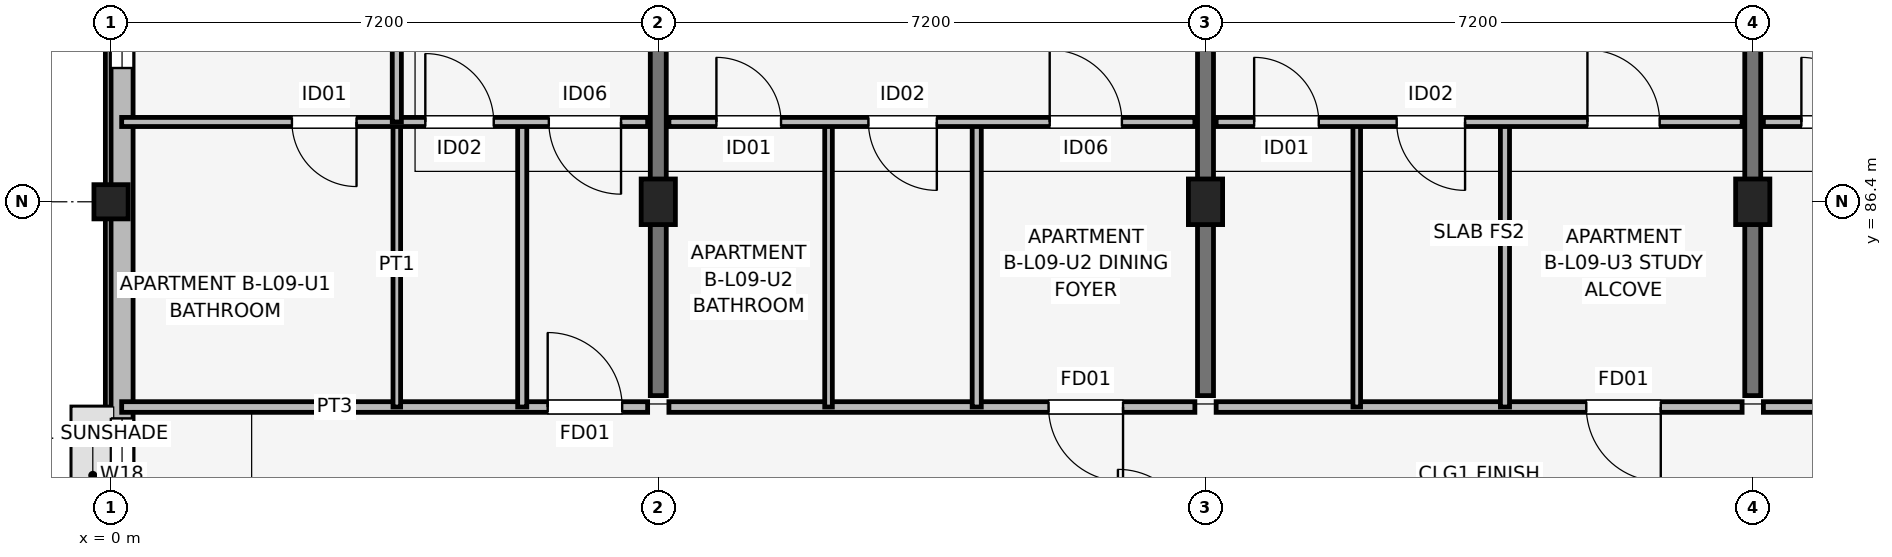
"""IFC4 building model, lengths in metres.
Left out: names, types, materials, properties, quantities, classifications, styles, units other than length and angle.
Written with IfcOpenShell. Run it as: python <this file> out.ifc"""

import sys

from ifc_helpers import new_model, si_unit, direction, frame, frame_2d, origin, origin_2d, place, context, subcontext, project, spatial, rectangle, extrude, element, fill, save


model = new_model("IFC4")
c1 = context("Model", 3, precision=1e-05, world=origin(), true_north=direction((0.0, 1.0)))
c2 = subcontext(c1, "Body", "Model", "MODEL_VIEW")
j1 = project(units=[si_unit("LENGTHUNIT", "METRE"), si_unit("PLANEANGLEUNIT", "RADIAN")], contexts=[c1])
p1 = place(None, origin())
s1 = spatial("IfcSite", under=j1, at=p1, CompositionType="ELEMENT")
p2 = place(p1, origin())
s2 = spatial("IfcBuilding", under=s1, at=p2, CompositionType="ELEMENT")
p3 = place(p2, frame((0.0, 0.0, 30.75)))
s3 = spatial("IfcBuildingStorey", under=s2, at=p3, CompositionType="ELEMENT", Elevation=30.75)
p4 = place(p3, frame((0.0, 86.4, 0.0), z_axis=(0.0, 0.0, 1.0), x_axis=(1.0, 0.0, 0.0)))
e1 = element("IfcColumn", 1, at=p4, inside=s3, PredefinedType="COLUMN", context=c2, shape_type="SweptSolid", body=[
    extrude(rectangle(XDim=0.45, YDim=0.45, at=origin_2d()), origin(), (0.0, 0.0, 1.0), 3.15),
])
for number, where, z_axis, x_axis in (
    (2, (7.2, 86.4, 0.0), (0.0, 0.0, 1.0), (1.0, 0.0, 0.0)),
    (3, (14.4, 86.4, 0.0), (0.0, 0.0, 1.0), (1.0, 0.0, 0.0)),
    (4, (21.6, 86.4, 0.0), (0.0, 0.0, 1.0), (1.0, 0.0, 0.0)),
):
    element("IfcColumn", number, at=place(p3, frame(where, z_axis=z_axis, x_axis=x_axis)), inside=s3, PredefinedType="COLUMN", context=c2, shape_type="SweptSolid", body=[
        extrude(rectangle(XDim=0.45, YDim=0.6, at=origin_2d()), origin(), (0.0, 0.0, 1.0), 3.15),
    ])
for number, where, z_axis, x_axis in (
    (5, (7.2, 83.85, 0.0), (0.0, 0.0, 1.0), (0.0, 1.0, 0.0)),
    (6, (14.4, 83.85, 0.0), (0.0, 0.0, 1.0), (0.0, 1.0, 0.0)),
    (7, (21.6, 83.85, 0.0), (0.0, 0.0, 1.0), (0.0, 1.0, 0.0)),
):
    element("IfcWall", number, at=place(p3, frame(where, z_axis=z_axis, x_axis=x_axis)), inside=s3, PredefinedType="SHEAR", context=c2, shape_type="SweptSolid", body=[
        extrude(rectangle(XDim=9.4, YDim=0.21, at=frame_2d((4.7, 0.0))), origin(), (0.0, 0.0, 1.0), 3.15),
    ])
p5 = place(p3, frame((0.145, 90.4, 0.0), z_axis=(0.0, 0.0, 1.0), x_axis=(0.0, -1.0, 0.0)))
e8 = element("IfcWall", 8, at=p5, inside=s3, PredefinedType="SOLIDWALL", context=c2, shape_type="SweptSolid", body=[
    extrude(rectangle(XDim=15.2, YDim=0.29, at=frame_2d((7.6, 0.0))), origin(), (0.0, 0.0, 1.0), 2.48),
])
p6 = place(p5, frame((6.85, 0.0, 1.05)))
e9 = element("IfcOpeningElement", 9, at=p6, cuts=e8, PredefinedType="OPENING", context=c2, shape_type="SweptSolid", body=[
    extrude(rectangle(XDim=1.5, YDim=1.15, at=frame_2d((0.75, 0.575))), frame((0.0, 0.155, 0.0), z_axis=(0.0, -1.0, 0.0), x_axis=(1.0, 0.0, 0.0)), (0.0, 0.0, 1.0), 0.31),
])
p7 = place(p5, frame((0.94, 0.0, 0.75)))
e10 = element("IfcOpeningElement", 10, at=p7, cuts=e8, PredefinedType="OPENING", context=c2, shape_type="SweptSolid", body=[
    extrude(rectangle(XDim=1.3, YDim=1.55, at=frame_2d((0.65, 0.775))), frame((0.0, 0.155, 0.0), z_axis=(0.0, -1.0, 0.0), x_axis=(1.0, 0.0, 0.0)), (0.0, 0.0, 1.0), 0.31),
])
p8 = place(p3, frame((0.14, 83.7, 0.0), z_axis=(0.0, 0.0, 1.0), x_axis=(1.0, 0.0, 0.0)))
e11 = element("IfcWall", 11, at=p8, inside=s3, PredefinedType="PARTITIONING", context=c2, shape_type="SweptSolid", body=[
    extrude(rectangle(XDim=6.92, YDim=0.14, at=frame_2d((3.46, 0.0))), origin(), (0.0, 0.0, 1.0), 2.38),
])
p9 = place(p8, frame((5.605, 0.0, 0.0)))
e12 = element("IfcOpeningElement", 12, at=p9, cuts=e11, PredefinedType="OPENING", context=c2, shape_type="SweptSolid", body=[
    extrude(rectangle(XDim=0.98, YDim=2.1, at=frame_2d((0.49, 1.05))), frame((0.0, 0.08, 0.0), z_axis=(0.0, -1.0, 0.0), x_axis=(1.0, 0.0, 0.0)), (0.0, 0.0, 1.0), 0.16),
])
p10 = place(p3, frame((3.76, 83.7, 0.0), z_axis=(0.0, 0.0, 1.0), x_axis=(0.0, 1.0, 0.0)))
e13 = element("IfcWall", 13, at=p10, inside=s3, PredefinedType="PARTITIONING", context=c2, shape_type="SweptSolid", body=[
    extrude(rectangle(XDim=3.75, YDim=0.1, at=frame_2d((1.875, 0.0))), origin(), (0.0, 0.0, 1.0), 2.38),
])
p11 = place(p3, frame((5.41, 83.7, 0.0), z_axis=(0.0, 0.0, 1.0), x_axis=(0.0, 1.0, 0.0)))
e14 = element("IfcWall", 14, at=p11, inside=s3, PredefinedType="PARTITIONING", context=c2, shape_type="SweptSolid", body=[
    extrude(rectangle(XDim=3.75, YDim=0.12, at=frame_2d((1.875, 0.0))), origin(), (0.0, 0.0, 1.0), 2.38),
])
p12 = place(p3, frame((0.14, 87.45, 0.0), z_axis=(0.0, 0.0, 1.0), x_axis=(1.0, 0.0, 0.0)))
e15 = element("IfcWall", 15, at=p12, inside=s3, PredefinedType="PARTITIONING", context=c2, shape_type="SweptSolid", body=[
    extrude(rectangle(XDim=6.92, YDim=0.12, at=frame_2d((3.46, 0.0))), origin(), (0.0, 0.0, 1.0), 2.38),
])
p13 = place(p12, frame((3.09, 0.0, 0.0), z_axis=(0.0, 0.0, 1.0), x_axis=(-1.0, 0.0, 0.0)))
e16 = element("IfcOpeningElement", 16, at=p13, cuts=e15, PredefinedType="OPENING", context=c2, shape_type="SweptSolid", body=[
    extrude(rectangle(XDim=0.85, YDim=2.08, at=frame_2d((0.425, 1.04))), frame((0.0, 0.07, 0.0), z_axis=(0.0, -1.0, 0.0), x_axis=(1.0, 0.0, 0.0)), (0.0, 0.0, 1.0), 0.14),
])
p14 = place(p12, frame((3.995, 0.0, 0.0)))
e17 = element("IfcOpeningElement", 17, at=p14, cuts=e15, PredefinedType="OPENING", context=c2, shape_type="SweptSolid", body=[
    extrude(rectangle(XDim=0.9, YDim=2.08, at=frame_2d((0.45, 1.04))), frame((0.0, 0.07, 0.0), z_axis=(0.0, -1.0, 0.0), x_axis=(1.0, 0.0, 0.0)), (0.0, 0.0, 1.0), 0.14),
])
p15 = place(p12, frame((6.57, 0.0, 0.0), z_axis=(0.0, 0.0, 1.0), x_axis=(-1.0, 0.0, 0.0)))
e18 = element("IfcOpeningElement", 18, at=p15, cuts=e15, PredefinedType="OPENING", context=c2, shape_type="SweptSolid", body=[
    extrude(rectangle(XDim=0.95, YDim=2.08, at=frame_2d((0.475, 1.04))), frame((0.0, 0.07, 0.0), z_axis=(0.0, -1.0, 0.0), x_axis=(1.0, 0.0, 0.0)), (0.0, 0.0, 1.0), 0.14),
])
p16 = place(p3, frame((3.76, 87.45, 0.0), z_axis=(0.0, 0.0, 1.0), x_axis=(0.0, 1.0, 0.0)))
e19 = element("IfcWall", 19, at=p16, inside=s3, PredefinedType="PARTITIONING", context=c2, shape_type="SweptSolid", body=[
    extrude(rectangle(XDim=5.85, YDim=0.12, at=frame_2d((2.925, 0.0))), origin(), (0.0, 0.0, 1.0), 2.38),
])
p17 = place(p16, frame((2.475, 0.0, 0.0)))
e20 = element("IfcOpeningElement", 20, at=p17, cuts=e19, PredefinedType="OPENING", context=c2, shape_type="SweptSolid", body=[
    extrude(rectangle(XDim=0.9, YDim=2.08, at=frame_2d((0.45, 1.04))), frame((0.0, 0.07, 0.0), z_axis=(0.0, -1.0, 0.0), x_axis=(1.0, 0.0, 0.0)), (0.0, 0.0, 1.0), 0.14),
])
p18 = place(p3, frame((7.34, 83.7, 0.0), z_axis=(0.0, 0.0, 1.0), x_axis=(1.0, 0.0, 0.0)))
e21 = element("IfcWall", 21, at=p18, inside=s3, PredefinedType="PARTITIONING", context=c2, shape_type="SweptSolid", body=[
    extrude(rectangle(XDim=6.92, YDim=0.14, at=frame_2d((3.46, 0.0))), origin(), (0.0, 0.0, 1.0), 2.38),
])
p19 = place(p18, frame((5.975, 0.0, 0.0), z_axis=(0.0, 0.0, 1.0), x_axis=(-1.0, 0.0, 0.0)))
e22 = element("IfcOpeningElement", 22, at=p19, cuts=e21, PredefinedType="OPENING", context=c2, shape_type="SweptSolid", body=[
    extrude(rectangle(XDim=0.98, YDim=2.1, at=frame_2d((0.49, 1.05))), frame((0.0, 0.08, 0.0), z_axis=(0.0, -1.0, 0.0), x_axis=(1.0, 0.0, 0.0)), (0.0, 0.0, 1.0), 0.16),
])
p20 = place(p3, frame((9.44, 83.7, 0.0), z_axis=(0.0, 0.0, 1.0), x_axis=(0.0, 1.0, 0.0)))
e23 = element("IfcWall", 23, at=p20, inside=s3, PredefinedType="PARTITIONING", context=c2, shape_type="SweptSolid", body=[
    extrude(rectangle(XDim=3.75, YDim=0.1, at=frame_2d((1.875, 0.0))), origin(), (0.0, 0.0, 1.0), 2.38),
])
p21 = place(p3, frame((11.39, 83.7, 0.0), z_axis=(0.0, 0.0, 1.0), x_axis=(0.0, 1.0, 0.0)))
e24 = element("IfcWall", 24, at=p21, inside=s3, PredefinedType="PARTITIONING", context=c2, shape_type="SweptSolid", body=[
    extrude(rectangle(XDim=3.75, YDim=0.12, at=frame_2d((1.875, 0.0))), origin(), (0.0, 0.0, 1.0), 2.38),
])
p22 = place(p3, frame((7.34, 87.45, 0.0), z_axis=(0.0, 0.0, 1.0), x_axis=(1.0, 0.0, 0.0)))
e25 = element("IfcWall", 25, at=p22, inside=s3, PredefinedType="PARTITIONING", context=c2, shape_type="SweptSolid", body=[
    extrude(rectangle(XDim=6.92, YDim=0.12, at=frame_2d((3.46, 0.0))), origin(), (0.0, 0.0, 1.0), 2.38),
])
p23 = place(p22, frame((0.625, 0.0, 0.0)))
e26 = element("IfcOpeningElement", 26, at=p23, cuts=e25, PredefinedType="OPENING", context=c2, shape_type="SweptSolid", body=[
    extrude(rectangle(XDim=0.85, YDim=2.08, at=frame_2d((0.425, 1.04))), frame((0.0, 0.07, 0.0), z_axis=(0.0, -1.0, 0.0), x_axis=(1.0, 0.0, 0.0)), (0.0, 0.0, 1.0), 0.14),
])
p24 = place(p22, frame((3.525, 0.0, 0.0), z_axis=(0.0, 0.0, 1.0), x_axis=(-1.0, 0.0, 0.0)))
e27 = element("IfcOpeningElement", 27, at=p24, cuts=e25, PredefinedType="OPENING", context=c2, shape_type="SweptSolid", body=[
    extrude(rectangle(XDim=0.9, YDim=2.08, at=frame_2d((0.45, 1.04))), frame((0.0, 0.07, 0.0), z_axis=(0.0, -1.0, 0.0), x_axis=(1.0, 0.0, 0.0)), (0.0, 0.0, 1.0), 0.14),
])
p25 = place(p22, frame((5.01, 0.0, 0.0)))
e28 = element("IfcOpeningElement", 28, at=p25, cuts=e25, PredefinedType="OPENING", context=c2, shape_type="SweptSolid", body=[
    extrude(rectangle(XDim=0.95, YDim=2.08, at=frame_2d((0.475, 1.04))), frame((0.0, 0.07, 0.0), z_axis=(0.0, -1.0, 0.0), x_axis=(1.0, 0.0, 0.0)), (0.0, 0.0, 1.0), 0.14),
])
p26 = place(p3, frame((14.54, 83.7, 0.0), z_axis=(0.0, 0.0, 1.0), x_axis=(1.0, 0.0, 0.0)))
e29 = element("IfcWall", 29, at=p26, inside=s3, PredefinedType="PARTITIONING", context=c2, shape_type="SweptSolid", body=[
    extrude(rectangle(XDim=6.92, YDim=0.14, at=frame_2d((3.46, 0.0))), origin(), (0.0, 0.0, 1.0), 2.38),
])
p27 = place(p26, frame((5.85, 0.0, 0.0), z_axis=(0.0, 0.0, 1.0), x_axis=(-1.0, 0.0, 0.0)))
e30 = element("IfcOpeningElement", 30, at=p27, cuts=e29, PredefinedType="OPENING", context=c2, shape_type="SweptSolid", body=[
    extrude(rectangle(XDim=0.98, YDim=2.1, at=frame_2d((0.49, 1.05))), frame((0.0, 0.08, 0.0), z_axis=(0.0, -1.0, 0.0), x_axis=(1.0, 0.0, 0.0)), (0.0, 0.0, 1.0), 0.16),
])
p28 = place(p3, frame((16.39, 83.7, 0.0), z_axis=(0.0, 0.0, 1.0), x_axis=(0.0, 1.0, 0.0)))
e31 = element("IfcWall", 31, at=p28, inside=s3, PredefinedType="PARTITIONING", context=c2, shape_type="SweptSolid", body=[
    extrude(rectangle(XDim=3.75, YDim=0.1, at=frame_2d((1.875, 0.0))), origin(), (0.0, 0.0, 1.0), 2.38),
])
p29 = place(p3, frame((18.34, 83.7, 0.0), z_axis=(0.0, 0.0, 1.0), x_axis=(0.0, 1.0, 0.0)))
e32 = element("IfcWall", 32, at=p29, inside=s3, PredefinedType="PARTITIONING", context=c2, shape_type="SweptSolid", body=[
    extrude(rectangle(XDim=3.75, YDim=0.12, at=frame_2d((1.875, 0.0))), origin(), (0.0, 0.0, 1.0), 2.38),
])
p30 = place(p3, frame((14.54, 87.45, 0.0), z_axis=(0.0, 0.0, 1.0), x_axis=(1.0, 0.0, 0.0)))
e33 = element("IfcWall", 33, at=p30, inside=s3, PredefinedType="PARTITIONING", context=c2, shape_type="SweptSolid", body=[
    extrude(rectangle(XDim=6.92, YDim=0.12, at=frame_2d((3.46, 0.0))), origin(), (0.0, 0.0, 1.0), 2.38),
])
p31 = place(p30, frame((0.5, 0.0, 0.0)))
e34 = element("IfcOpeningElement", 34, at=p31, cuts=e33, PredefinedType="OPENING", context=c2, shape_type="SweptSolid", body=[
    extrude(rectangle(XDim=0.85, YDim=2.08, at=frame_2d((0.425, 1.04))), frame((0.0, 0.07, 0.0), z_axis=(0.0, -1.0, 0.0), x_axis=(1.0, 0.0, 0.0)), (0.0, 0.0, 1.0), 0.14),
])
p32 = place(p30, frame((3.275, 0.0, 0.0), z_axis=(0.0, 0.0, 1.0), x_axis=(-1.0, 0.0, 0.0)))
e35 = element("IfcOpeningElement", 35, at=p32, cuts=e33, PredefinedType="OPENING", context=c2, shape_type="SweptSolid", body=[
    extrude(rectangle(XDim=0.9, YDim=2.08, at=frame_2d((0.45, 1.04))), frame((0.0, 0.07, 0.0), z_axis=(0.0, -1.0, 0.0), x_axis=(1.0, 0.0, 0.0)), (0.0, 0.0, 1.0), 0.14),
])
p33 = place(p30, frame((4.885, 0.0, 0.0)))
e36 = element("IfcOpeningElement", 36, at=p33, cuts=e33, PredefinedType="OPENING", context=c2, shape_type="SweptSolid", body=[
    extrude(rectangle(XDim=0.95, YDim=2.08, at=frame_2d((0.475, 1.04))), frame((0.0, 0.07, 0.0), z_axis=(0.0, -1.0, 0.0), x_axis=(1.0, 0.0, 0.0)), (0.0, 0.0, 1.0), 0.14),
])
p34 = place(p3, frame((21.74, 83.7, 0.0), z_axis=(0.0, 0.0, 1.0), x_axis=(1.0, 0.0, 0.0)))
e37 = element("IfcWall", 37, at=p34, inside=s3, PredefinedType="PARTITIONING", context=c2, shape_type="SweptSolid", body=[
    extrude(rectangle(XDim=6.92, YDim=0.14, at=frame_2d((3.46, 0.0))), origin(), (0.0, 0.0, 1.0), 2.38),
])
p35 = place(p34, frame((6.0, 0.0, 0.0), z_axis=(0.0, 0.0, 1.0), x_axis=(-1.0, 0.0, 0.0)))
e38 = element("IfcOpeningElement", 38, at=p35, cuts=e37, PredefinedType="OPENING", context=c2, shape_type="SweptSolid", body=[
    extrude(rectangle(XDim=0.98, YDim=2.1, at=frame_2d((0.49, 1.05))), frame((0.0, 0.08, 0.0), z_axis=(0.0, -1.0, 0.0), x_axis=(1.0, 0.0, 0.0)), (0.0, 0.0, 1.0), 0.16),
])
p36 = place(p3, frame((21.74, 87.45, 0.0), z_axis=(0.0, 0.0, 1.0), x_axis=(1.0, 0.0, 0.0)))
e39 = element("IfcWall", 39, at=p36, inside=s3, PredefinedType="PARTITIONING", context=c2, shape_type="SweptSolid", body=[
    extrude(rectangle(XDim=6.92, YDim=0.12, at=frame_2d((3.46, 0.0))), origin(), (0.0, 0.0, 1.0), 2.38),
])
p37 = place(p36, frame((0.5, 0.0, 0.0)))
e40 = element("IfcOpeningElement", 40, at=p37, cuts=e39, PredefinedType="OPENING", context=c2, shape_type="SweptSolid", body=[
    extrude(rectangle(XDim=0.85, YDim=2.08, at=frame_2d((0.425, 1.04))), frame((0.0, 0.07, 0.0), z_axis=(0.0, -1.0, 0.0), x_axis=(1.0, 0.0, 0.0)), (0.0, 0.0, 1.0), 0.14),
])
p38 = place(p36, frame((3.425, 0.0, 0.0), z_axis=(0.0, 0.0, 1.0), x_axis=(-1.0, 0.0, 0.0)))
e41 = element("IfcOpeningElement", 41, at=p38, cuts=e39, PredefinedType="OPENING", context=c2, shape_type="SweptSolid", body=[
    extrude(rectangle(XDim=0.9, YDim=2.08, at=frame_2d((0.45, 1.04))), frame((0.0, 0.07, 0.0), z_axis=(0.0, -1.0, 0.0), x_axis=(1.0, 0.0, 0.0)), (0.0, 0.0, 1.0), 0.14),
])
p39 = place(p36, frame((5.035, 0.0, 0.0)))
e42 = element("IfcOpeningElement", 42, at=p39, cuts=e39, PredefinedType="OPENING", context=c2, shape_type="SweptSolid", body=[
    extrude(rectangle(XDim=0.95, YDim=2.08, at=frame_2d((0.475, 1.04))), frame((0.0, 0.07, 0.0), z_axis=(0.0, -1.0, 0.0), x_axis=(1.0, 0.0, 0.0)), (0.0, 0.0, 1.0), 0.14),
])
p40 = place(p6, origin())
e43 = element("IfcWindow", 43, at=p40, inside=s3, PartitioningType="SINGLE_PANEL", PredefinedType="WINDOW", context=c2, shape_type="SweptSolid", body=[
    extrude(rectangle(XDim=1.5, YDim=1.15, at=frame_2d((0.75, 0.575))), frame((0.0, 0.03, 0.0), z_axis=(0.0, -1.0, 0.0), x_axis=(1.0, 0.0, 0.0)), (0.0, 0.0, 1.0), 0.06),
])
fill(e9, e43)
p41 = place(p7, origin())
e44 = element("IfcWindow", 44, at=p41, inside=s3, PartitioningType="SINGLE_PANEL", PredefinedType="WINDOW", context=c2, shape_type="SweptSolid", body=[
    extrude(rectangle(XDim=1.3, YDim=1.55, at=frame_2d((0.65, 0.775))), frame((0.0, 0.03, 0.0), z_axis=(0.0, -1.0, 0.0), x_axis=(1.0, 0.0, 0.0)), (0.0, 0.0, 1.0), 0.06),
])
fill(e10, e44)
p42 = place(p9, origin())
e45 = element("IfcDoor", 45, at=p42, inside=s3, OperationType="SINGLE_SWING_LEFT", PredefinedType="DOOR", context=c2, shape_type="SweptSolid", body=[
    extrude(rectangle(XDim=0.98, YDim=2.1, at=frame_2d((0.49, 1.05))), frame((0.0, 0.025, 0.0), z_axis=(0.0, -1.0, 0.0), x_axis=(1.0, 0.0, 0.0)), (0.0, 0.0, 1.0), 0.05),
])
fill(e12, e45)
p43 = place(p13, origin())
e46 = element("IfcDoor", 46, at=p43, inside=s3, OperationType="SINGLE_SWING_RIGHT", PredefinedType="DOOR", context=c2, shape_type="SweptSolid", body=[
    extrude(rectangle(XDim=0.85, YDim=2.08, at=frame_2d((0.425, 1.04))), frame((0.0, 0.025, 0.0), z_axis=(0.0, -1.0, 0.0), x_axis=(1.0, 0.0, 0.0)), (0.0, 0.0, 1.0), 0.05),
])
fill(e16, e46)
p44 = place(p14, origin())
e47 = element("IfcDoor", 47, at=p44, inside=s3, OperationType="SINGLE_SWING_LEFT", PredefinedType="DOOR", context=c2, shape_type="SweptSolid", body=[
    extrude(rectangle(XDim=0.9, YDim=2.08, at=frame_2d((0.45, 1.04))), frame((0.0, 0.025, 0.0), z_axis=(0.0, -1.0, 0.0), x_axis=(1.0, 0.0, 0.0)), (0.0, 0.0, 1.0), 0.05),
])
fill(e17, e47)
p45 = place(p15, origin())
e48 = element("IfcDoor", 48, at=p45, inside=s3, OperationType="SINGLE_SWING_RIGHT", PredefinedType="DOOR", context=c2, shape_type="SweptSolid", body=[
    extrude(rectangle(XDim=0.95, YDim=2.08, at=frame_2d((0.475, 1.04))), frame((0.0, 0.025, 0.0), z_axis=(0.0, -1.0, 0.0), x_axis=(1.0, 0.0, 0.0)), (0.0, 0.0, 1.0), 0.05),
])
fill(e18, e48)
p46 = place(p19, origin())
e49 = element("IfcDoor", 49, at=p46, inside=s3, OperationType="SINGLE_SWING_RIGHT", PredefinedType="DOOR", context=c2, shape_type="SweptSolid", body=[
    extrude(rectangle(XDim=0.98, YDim=2.1, at=frame_2d((0.49, 1.05))), frame((0.0, 0.025, 0.0), z_axis=(0.0, -1.0, 0.0), x_axis=(1.0, 0.0, 0.0)), (0.0, 0.0, 1.0), 0.05),
])
fill(e22, e49)
p47 = place(p23, origin())
e50 = element("IfcDoor", 50, at=p47, inside=s3, OperationType="SINGLE_SWING_LEFT", PredefinedType="DOOR", context=c2, shape_type="SweptSolid", body=[
    extrude(rectangle(XDim=0.85, YDim=2.08, at=frame_2d((0.425, 1.04))), frame((0.0, 0.025, 0.0), z_axis=(0.0, -1.0, 0.0), x_axis=(1.0, 0.0, 0.0)), (0.0, 0.0, 1.0), 0.05),
])
fill(e26, e50)
p48 = place(p24, origin())
e51 = element("IfcDoor", 51, at=p48, inside=s3, OperationType="SINGLE_SWING_RIGHT", PredefinedType="DOOR", context=c2, shape_type="SweptSolid", body=[
    extrude(rectangle(XDim=0.9, YDim=2.08, at=frame_2d((0.45, 1.04))), frame((0.0, 0.025, 0.0), z_axis=(0.0, -1.0, 0.0), x_axis=(1.0, 0.0, 0.0)), (0.0, 0.0, 1.0), 0.05),
])
fill(e27, e51)
p49 = place(p25, origin())
e52 = element("IfcDoor", 52, at=p49, inside=s3, OperationType="SINGLE_SWING_LEFT", PredefinedType="DOOR", context=c2, shape_type="SweptSolid", body=[
    extrude(rectangle(XDim=0.95, YDim=2.08, at=frame_2d((0.475, 1.04))), frame((0.0, 0.025, 0.0), z_axis=(0.0, -1.0, 0.0), x_axis=(1.0, 0.0, 0.0)), (0.0, 0.0, 1.0), 0.05),
])
fill(e28, e52)
p50 = place(p27, origin())
e53 = element("IfcDoor", 53, at=p50, inside=s3, OperationType="SINGLE_SWING_RIGHT", PredefinedType="DOOR", context=c2, shape_type="SweptSolid", body=[
    extrude(rectangle(XDim=0.98, YDim=2.1, at=frame_2d((0.49, 1.05))), frame((0.0, 0.025, 0.0), z_axis=(0.0, -1.0, 0.0), x_axis=(1.0, 0.0, 0.0)), (0.0, 0.0, 1.0), 0.05),
])
fill(e30, e53)
p51 = place(p31, origin())
e54 = element("IfcDoor", 54, at=p51, inside=s3, OperationType="SINGLE_SWING_LEFT", PredefinedType="DOOR", context=c2, shape_type="SweptSolid", body=[
    extrude(rectangle(XDim=0.85, YDim=2.08, at=frame_2d((0.425, 1.04))), frame((0.0, 0.025, 0.0), z_axis=(0.0, -1.0, 0.0), x_axis=(1.0, 0.0, 0.0)), (0.0, 0.0, 1.0), 0.05),
])
fill(e34, e54)
p52 = place(p32, origin())
e55 = element("IfcDoor", 55, at=p52, inside=s3, OperationType="SINGLE_SWING_RIGHT", PredefinedType="DOOR", context=c2, shape_type="SweptSolid", body=[
    extrude(rectangle(XDim=0.9, YDim=2.08, at=frame_2d((0.45, 1.04))), frame((0.0, 0.025, 0.0), z_axis=(0.0, -1.0, 0.0), x_axis=(1.0, 0.0, 0.0)), (0.0, 0.0, 1.0), 0.05),
])
fill(e35, e55)
p53 = place(p33, origin())
e56 = element("IfcDoor", 56, at=p53, inside=s3, OperationType="SINGLE_SWING_LEFT", PredefinedType="DOOR", context=c2, shape_type="SweptSolid", body=[
    extrude(rectangle(XDim=0.95, YDim=2.08, at=frame_2d((0.475, 1.04))), frame((0.0, 0.025, 0.0), z_axis=(0.0, -1.0, 0.0), x_axis=(1.0, 0.0, 0.0)), (0.0, 0.0, 1.0), 0.05),
])
fill(e36, e56)
p54 = place(p37, origin())
e57 = element("IfcDoor", 57, at=p54, inside=s3, OperationType="SINGLE_SWING_LEFT", PredefinedType="DOOR", context=c2, shape_type="SweptSolid", body=[
    extrude(rectangle(XDim=0.85, YDim=2.08, at=frame_2d((0.425, 1.04))), frame((0.0, 0.025, 0.0), z_axis=(0.0, -1.0, 0.0), x_axis=(1.0, 0.0, 0.0)), (0.0, 0.0, 1.0), 0.05),
])
fill(e40, e57)
save(model, sys.argv[1])
